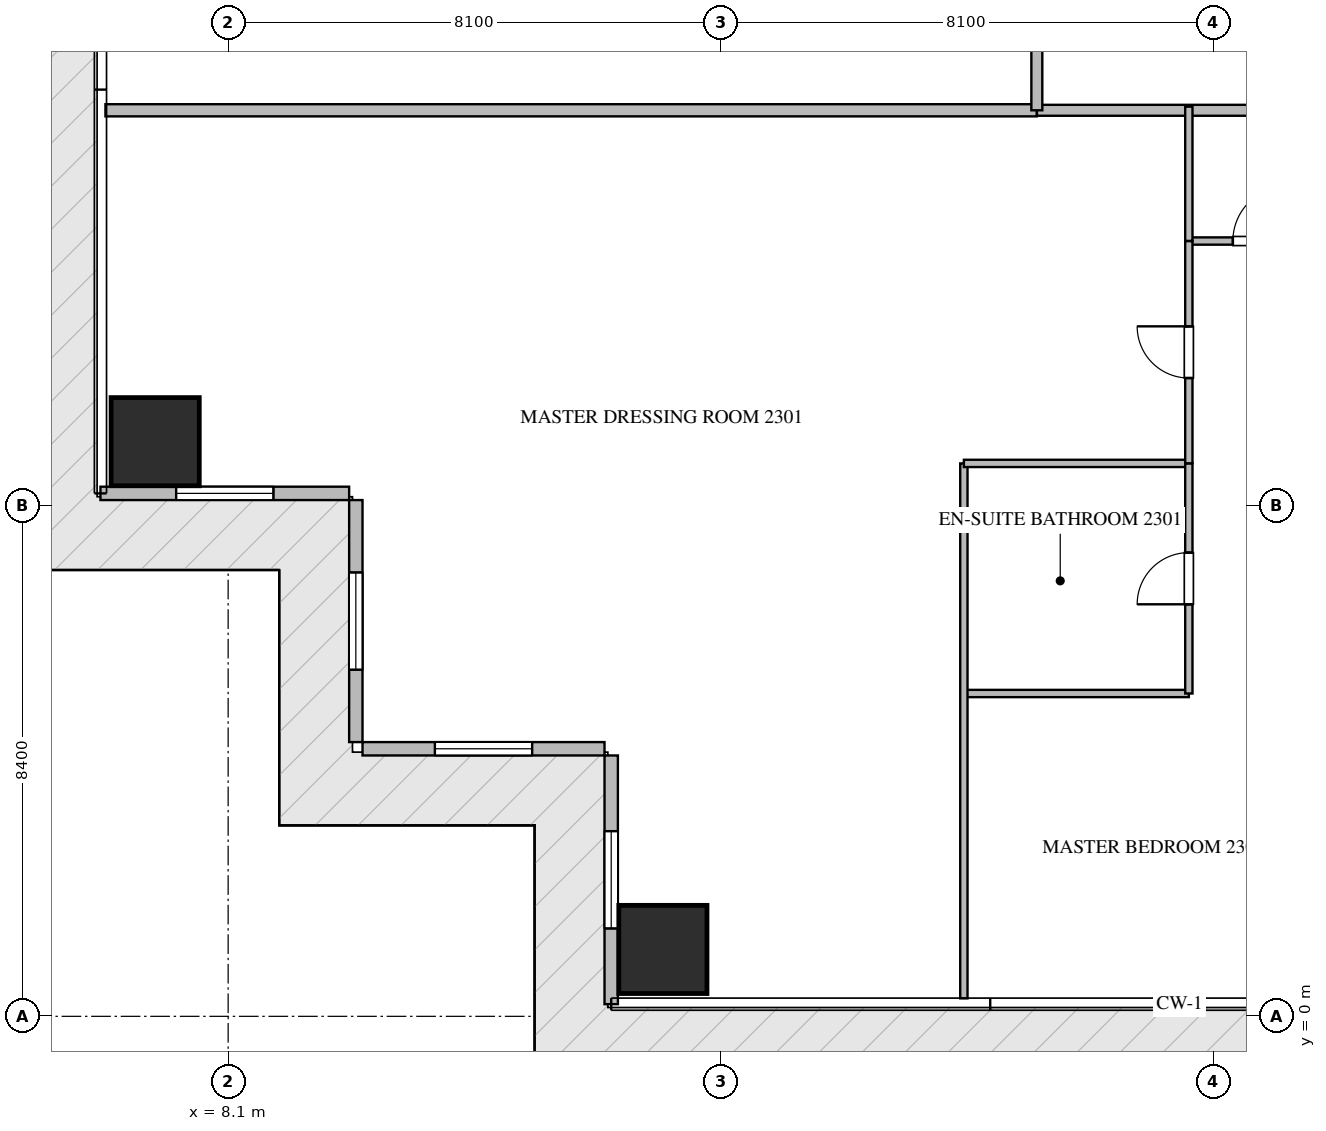
"""IFC4 building model, lengths in metres.
Left out: names, types, materials, properties, quantities, classifications, styles, units other than length and angle.
Written with IfcOpenShell. Run it as: python <this file> out.ifc"""

import sys

from ifc_helpers import new_model, si_unit, direction, frame, frame_2d, origin, origin_2d, place, context, subcontext, project, spatial, rectangle, extrude, source, transform, mapped, element, fill, save


model = new_model("IFC4")
c1 = context("Model", 3, precision=1e-05, world=origin(), true_north=direction((0.0, 1.0)))
c2 = subcontext(c1, "Body", "Model", "MODEL_VIEW")
j1 = project(units=[si_unit("LENGTHUNIT", "METRE"), si_unit("PLANEANGLEUNIT", "RADIAN")], contexts=[c1])
p1 = place(None, origin())
s1 = spatial("IfcSite", under=j1, at=p1, CompositionType="ELEMENT")
p2 = place(p1, origin())
s2 = spatial("IfcBuilding", under=s1, at=p2, CompositionType="ELEMENT")
p3 = place(p2, frame((0.0, 0.0, 94.2)))
s3 = spatial("IfcBuildingStorey", under=s2, at=p3, CompositionType="ELEMENT", Elevation=94.2)
m1 = source(origin(), c2, "Body", "SweptSolid", [
    extrude(rectangle(XDim=1.45, YDim=1.45, at=origin_2d()), origin(), (0.0, 0.0, 1.0), 3.75),
])
for number, where, z_axis, x_axis in (
    (1, (15.25, 1.1, -0.26), (0.0, 0.0, 1.0), (1.0, 0.0, 0.0)),
    (2, (6.9, 9.45, -0.26), (0.0, 0.0, 1.0), (1.0, 0.0, 0.0)),
):
    element("IfcColumn", number, at=place(p3, frame(where, z_axis=z_axis, x_axis=x_axis)), inside=s3, PredefinedType="COLUMN", context=c2, shape_type="MappedRepresentation", body=[
        mapped(m1, transform((0.0, 0.0, 0.0), scale=1.0)),
    ])
p4 = place(p3, frame((6.0, 8.6, 0.0), z_axis=(0.0, 0.0, 1.0), x_axis=(1.0, 0.0, 0.0)))
e3 = element("IfcWall", 3, at=p4, inside=s3, PredefinedType="ELEMENTEDWALL", context=c2, shape_type="SweptSolid", body=[
    extrude(rectangle(XDim=4.09, YDim=0.22, at=frame_2d((2.045, 0.0))), origin(), (0.0, 0.0, 1.0), 3.475),
])
p5 = place(p4, frame((1.245, 0.0, 0.65)))
e4 = element("IfcOpeningElement", 4, at=p5, cuts=e3, PredefinedType="OPENING", context=c2, shape_type="SweptSolid", body=[
    extrude(rectangle(XDim=1.6, YDim=2.1, at=frame_2d((0.8, 1.05))), frame((0.0, 0.12, 0.0), z_axis=(0.0, -1.0, 0.0), x_axis=(1.0, 0.0, 0.0)), (0.0, 0.0, 1.0), 0.24),
])
p6 = place(p3, frame((10.2, 8.49, 0.0), z_axis=(0.0, 0.0, 1.0), x_axis=(0.0, -1.0, 0.0)))
e5 = element("IfcWall", 5, at=p6, inside=s3, PredefinedType="ELEMENTEDWALL", context=c2, shape_type="SweptSolid", body=[
    extrude(rectangle(XDim=3.98, YDim=0.22, at=frame_2d((1.99, 0.0))), origin(), (0.0, 0.0, 1.0), 3.475),
])
p7 = place(p6, frame((1.19, 0.0, 0.65)))
e6 = element("IfcOpeningElement", 6, at=p7, cuts=e5, PredefinedType="OPENING", context=c2, shape_type="SweptSolid", body=[
    extrude(rectangle(XDim=1.6, YDim=2.1, at=frame_2d((0.8, 1.05))), frame((0.0, 0.12, 0.0), z_axis=(0.0, -1.0, 0.0), x_axis=(1.0, 0.0, 0.0)), (0.0, 0.0, 1.0), 0.24),
])
p8 = place(p3, frame((10.31, 4.4, 0.0), z_axis=(0.0, 0.0, 1.0), x_axis=(1.0, 0.0, 0.0)))
e7 = element("IfcWall", 7, at=p8, inside=s3, PredefinedType="ELEMENTEDWALL", context=c2, shape_type="SweptSolid", body=[
    extrude(rectangle(XDim=3.98, YDim=0.22, at=frame_2d((1.99, 0.0))), origin(), (0.0, 0.0, 1.0), 3.475),
])
p9 = place(p8, frame((1.19, 0.0, 0.65)))
e8 = element("IfcOpeningElement", 8, at=p9, cuts=e7, PredefinedType="OPENING", context=c2, shape_type="SweptSolid", body=[
    extrude(rectangle(XDim=1.6, YDim=2.1, at=frame_2d((0.8, 1.05))), frame((0.0, 0.12, 0.0), z_axis=(0.0, -1.0, 0.0), x_axis=(1.0, 0.0, 0.0)), (0.0, 0.0, 1.0), 0.24),
])
p10 = place(p3, frame((14.4, 4.29, 0.0), z_axis=(0.0, 0.0, 1.0), x_axis=(0.0, -1.0, 0.0)))
e9 = element("IfcWall", 9, at=p10, inside=s3, PredefinedType="ELEMENTEDWALL", context=c2, shape_type="SweptSolid", body=[
    extrude(rectangle(XDim=4.09, YDim=0.22, at=frame_2d((2.045, 0.0))), origin(), (0.0, 0.0, 1.0), 3.475),
])
p11 = place(p10, frame((1.245, 0.0, 0.65)))
e10 = element("IfcOpeningElement", 10, at=p11, cuts=e9, PredefinedType="OPENING", context=c2, shape_type="SweptSolid", body=[
    extrude(rectangle(XDim=1.6, YDim=2.1, at=frame_2d((0.8, 1.05))), frame((0.0, 0.12, 0.0), z_axis=(0.0, -1.0, 0.0), x_axis=(1.0, 0.0, 0.0)), (0.0, 0.0, 1.0), 0.24),
])
p12 = place(p3, frame((6.082, 14.9, 0.0), z_axis=(0.0, 0.0, 1.0), x_axis=(1.0, 0.0, 0.0)))
e11 = element("IfcWall", 11, at=p12, inside=s3, PredefinedType="PARTITIONING", context=c2, shape_type="SweptSolid", body=[
    extrude(rectangle(XDim=15.318, YDim=0.2, at=frame_2d((7.659, 0.0))), origin(), (0.0, 0.0, 1.0), 3.49),
])
p13 = place(p3, frame((21.402, 14.9, 0.0), z_axis=(0.0, 0.0, 1.0), x_axis=(1.0, 0.0, 0.0)))
e12 = element("IfcWall", 12, at=p13, inside=s3, PredefinedType="PARTITIONING", context=c2, shape_type="SweptSolid", body=[
    extrude(rectangle(XDim=21.996, YDim=0.18, at=frame_2d((10.998, 0.0))), origin(), (0.0, 0.0, 1.0), 3.49),
])
p14 = place(p13, frame((15.222, 0.0, 0.0)))
e13 = element("IfcOpeningElement", 13, at=p14, cuts=e12, PredefinedType="OPENING", context=c2, shape_type="SweptSolid", body=[
    extrude(rectangle(XDim=1.0, YDim=2.15, at=frame_2d((0.5, 1.075))), frame((0.0, 0.1, 0.0), z_axis=(0.0, -1.0, 0.0), x_axis=(1.0, 0.0, 0.0)), (0.0, 0.0, 1.0), 0.2),
])
p15 = place(p3, frame((21.4, 14.9, 0.0), z_axis=(0.0, 0.0, 1.0), x_axis=(0.0, 1.0, 0.0)))
e14 = element("IfcWall", 14, at=p15, inside=s3, PredefinedType="PARTITIONING", context=c2, shape_type="SweptSolid", body=[
    extrude(rectangle(XDim=20.6, YDim=0.18, at=frame_2d((10.3, 0.0))), origin(), (0.0, 0.0, 1.0), 3.49),
])
p16 = place(p15, frame((1.96, 0.0, 0.0)))
e15 = element("IfcOpeningElement", 15, at=p16, cuts=e14, PredefinedType="OPENING", context=c2, shape_type="SweptSolid", body=[
    extrude(rectangle(XDim=1.0, YDim=2.15, at=frame_2d((0.5, 1.075))), frame((0.0, 0.1, 0.0), z_axis=(0.0, -1.0, 0.0), x_axis=(1.0, 0.0, 0.0)), (0.0, 0.0, 1.0), 0.2),
])
p17 = place(p3, frame((23.9, 12.75, 0.0), z_axis=(0.0, 0.0, 1.0), x_axis=(1.0, 0.0, 0.0)))
e16 = element("IfcWall", 16, at=p17, inside=s3, PredefinedType="PARTITIONING", context=c2, shape_type="SweptSolid", body=[
    extrude(rectangle(XDim=2.348, YDim=0.12, at=frame_2d((1.174, 0.0))), origin(), (0.0, 0.0, 1.0), 3.49),
])
p18 = place(p17, frame((0.724, 0.0, 0.0)))
e17 = element("IfcOpeningElement", 17, at=p18, cuts=e16, PredefinedType="OPENING", context=c2, shape_type="SweptSolid", body=[
    extrude(rectangle(XDim=0.9, YDim=2.1, at=frame_2d((0.45, 1.05))), frame((0.0, 0.07, 0.0), z_axis=(0.0, -1.0, 0.0), x_axis=(1.0, 0.0, 0.0)), (0.0, 0.0, 1.0), 0.14),
])
p19 = place(p3, frame((20.2, 5.309, 0.0), z_axis=(0.0, 0.0, 1.0), x_axis=(1.0, 0.0, 0.0)))
e18 = element("IfcWall", 18, at=p19, inside=s3, PredefinedType="PARTITIONING", context=c2, shape_type="SweptSolid", body=[
    extrude(rectangle(XDim=3.7, YDim=0.12, at=frame_2d((1.85, 0.0))), origin(), (0.0, 0.0, 1.0), 3.49),
])
p20 = place(p3, frame((20.2, 0.295, 0.0), z_axis=(0.0, 0.0, 1.0), x_axis=(0.0, 1.0, 0.0)))
e19 = element("IfcWall", 19, at=p20, inside=s3, PredefinedType="PARTITIONING", context=c2, shape_type="SweptSolid", body=[
    extrude(rectangle(XDim=8.798, YDim=0.12, at=frame_2d((4.399, 0.0))), origin(), (0.0, 0.0, 1.0), 3.49),
])
p21 = place(p3, frame((20.2, 9.093, 0.0), z_axis=(0.0, 0.0, 1.0), x_axis=(1.0, 0.0, 0.0)))
e20 = element("IfcWall", 20, at=p21, inside=s3, PredefinedType="PARTITIONING", context=c2, shape_type="SweptSolid", body=[
    extrude(rectangle(XDim=3.7, YDim=0.12, at=frame_2d((1.85, 0.0))), origin(), (0.0, 0.0, 1.0), 3.49),
])
p22 = place(p3, frame((23.9, 5.309, 0.0), z_axis=(0.0, 0.0, 1.0), x_axis=(0.0, 1.0, 0.0)))
e21 = element("IfcWall", 21, at=p22, inside=s3, PredefinedType="PARTITIONING", context=c2, shape_type="SweptSolid", body=[
    extrude(rectangle(XDim=3.784, YDim=0.12, at=frame_2d((1.892, 0.0))), origin(), (0.0, 0.0, 1.0), 3.49),
])
p23 = place(p22, frame((1.467, 0.0, 0.0)))
e22 = element("IfcOpeningElement", 22, at=p23, cuts=e21, PredefinedType="OPENING", context=c2, shape_type="SweptSolid", body=[
    extrude(rectangle(XDim=0.85, YDim=2.1, at=frame_2d((0.425, 1.05))), frame((0.0, 0.07, 0.0), z_axis=(0.0, -1.0, 0.0), x_axis=(1.0, 0.0, 0.0)), (0.0, 0.0, 1.0), 0.14),
])
p24 = place(p3, frame((23.9, 9.095, 0.0), z_axis=(0.0, 0.0, 1.0), x_axis=(0.0, 1.0, 0.0)))
e23 = element("IfcWall", 23, at=p24, inside=s3, PredefinedType="PARTITIONING", context=c2, shape_type="SweptSolid", body=[
    extrude(rectangle(XDim=3.655, YDim=0.12, at=frame_2d((1.828, 0.0))), origin(), (0.0, 0.0, 1.0), 3.49),
])
p25 = place(p24, frame((1.402, 0.0, 0.0)))
e24 = element("IfcOpeningElement", 24, at=p25, cuts=e23, PredefinedType="OPENING", context=c2, shape_type="SweptSolid", body=[
    extrude(rectangle(XDim=0.85, YDim=2.1, at=frame_2d((0.425, 1.05))), frame((0.0, 0.07, 0.0), z_axis=(0.0, -1.0, 0.0), x_axis=(1.0, 0.0, 0.0)), (0.0, 0.0, 1.0), 0.14),
])
p26 = place(p3, frame((23.9, 12.752, 0.0), z_axis=(0.0, 0.0, 1.0), x_axis=(0.0, 1.0, 0.0)))
e25 = element("IfcWall", 25, at=p26, inside=s3, PredefinedType="PARTITIONING", context=c2, shape_type="SweptSolid", body=[
    extrude(rectangle(XDim=2.208, YDim=0.12, at=frame_2d((1.104, 0.0))), origin(), (0.0, 0.0, 1.0), 3.49),
])
m2 = source(origin(), c2, "Body", "SweptSolid", [
    extrude(rectangle(XDim=1.6, YDim=2.1, at=frame_2d((0.8, 1.05))), frame((0.0, 0.03, 0.0), z_axis=(0.0, -1.0, 0.0), x_axis=(1.0, 0.0, 0.0)), (0.0, 0.0, 1.0), 0.06),
])
p27 = place(p5, origin())
e26 = element("IfcWindow", 26, at=p27, inside=s3, PartitioningType="SINGLE_PANEL", PredefinedType="WINDOW", context=c2, shape_type="MappedRepresentation", body=[
    mapped(m2, transform((0.0, 0.0, 0.0), scale=1.0)),
])
fill(e4, e26)
p28 = place(p7, origin())
e27 = element("IfcWindow", 27, at=p28, inside=s3, PartitioningType="SINGLE_PANEL", PredefinedType="WINDOW", context=c2, shape_type="MappedRepresentation", body=[
    mapped(m2, transform((0.0, 0.0, 0.0), scale=1.0)),
])
fill(e6, e27)
p29 = place(p9, origin())
e28 = element("IfcWindow", 28, at=p29, inside=s3, PartitioningType="SINGLE_PANEL", PredefinedType="WINDOW", context=c2, shape_type="MappedRepresentation", body=[
    mapped(m2, transform((0.0, 0.0, 0.0), scale=1.0)),
])
fill(e8, e28)
p30 = place(p11, origin())
e29 = element("IfcWindow", 29, at=p30, inside=s3, PartitioningType="SINGLE_PANEL", PredefinedType="WINDOW", context=c2, shape_type="MappedRepresentation", body=[
    mapped(m2, transform((0.0, 0.0, 0.0), scale=1.0)),
])
fill(e10, e29)
m3 = source(origin(), c2, "Body", "SweptSolid", [
    extrude(rectangle(XDim=0.9, YDim=2.1, at=frame_2d((0.45, 1.05))), frame((0.0, 0.025, 0.0), z_axis=(0.0, -1.0, 0.0), x_axis=(1.0, 0.0, 0.0)), (0.0, 0.0, 1.0), 0.05),
])
p31 = place(p18, origin())
e30 = element("IfcDoor", 30, at=p31, inside=s3, OperationType="SINGLE_SWING_RIGHT", PredefinedType="DOOR", context=c2, shape_type="MappedRepresentation", body=[
    mapped(m3, transform((0.0, 0.0, 0.0), scale=1.0)),
])
fill(e17, e30)
m4 = source(origin(), c2, "Body", "SweptSolid", [
    extrude(rectangle(XDim=0.85, YDim=2.1, at=frame_2d((0.425, 1.05))), frame((0.0, 0.025, 0.0), z_axis=(0.0, -1.0, 0.0), x_axis=(1.0, 0.0, 0.0)), (0.0, 0.0, 1.0), 0.05),
])
p32 = place(p23, origin())
e31 = element("IfcDoor", 31, at=p32, inside=s3, OperationType="SINGLE_SWING_LEFT", PredefinedType="DOOR", context=c2, shape_type="MappedRepresentation", body=[
    mapped(m4, transform((0.0, 0.0, 0.0), scale=1.0)),
])
fill(e22, e31)
p33 = place(p25, origin())
e32 = element("IfcDoor", 32, at=p33, inside=s3, OperationType="SINGLE_SWING_RIGHT", PredefinedType="DOOR", context=c2, shape_type="MappedRepresentation", body=[
    mapped(m4, transform((0.0, 0.0, 0.0), scale=1.0)),
])
fill(e24, e32)
save(model, sys.argv[1])
